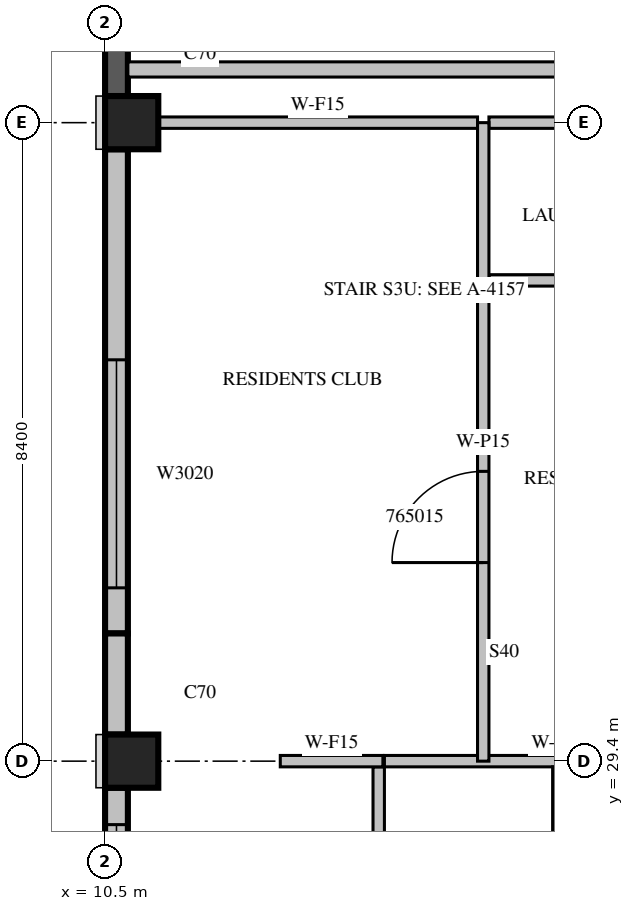
"""IFC4 building model, lengths in metres.
Left out: names, types, materials, properties, quantities, classifications, styles, units other than length and angle.
Written with IfcOpenShell. Run it as: python <this file> out.ifc"""

import sys

from ifc_helpers import new_model, si_unit, direction, frame, frame_2d, origin, origin_2d, place, context, subcontext, project, spatial, rectangle, extrude, source, transform, mapped, element, fill, save


model = new_model("IFC4")
c1 = context("Model", 3, precision=1e-05, world=origin(), true_north=direction((0.0, 1.0)))
c2 = subcontext(c1, "Body", "Model", "MODEL_VIEW")
j1 = project(units=[si_unit("LENGTHUNIT", "METRE"), si_unit("PLANEANGLEUNIT", "RADIAN")], contexts=[c1])
p1 = place(None, origin())
s1 = spatial("IfcSite", under=j1, at=p1, CompositionType="ELEMENT")
p2 = place(p1, origin())
s2 = spatial("IfcBuilding", under=s1, at=p2, CompositionType="ELEMENT")
p3 = place(p2, frame((0.0, 0.0, 288.0)))
s3 = spatial("IfcBuildingStorey", under=s2, at=p3, CompositionType="ELEMENT", Elevation=288.0)
m1 = source(origin(), c2, "Body", "SweptSolid", [
    extrude(rectangle(XDim=0.7, YDim=0.7, at=origin_2d()), origin(), (0.0, 0.0, 1.0), 3.5),
])
for number, where, z_axis, x_axis in (
    (1, (10.85, 29.4, 0.0), (0.0, 0.0, 1.0), (1.0, 0.0, 0.0)),
    (2, (10.85, 37.8, 0.0), (0.0, 0.0, 1.0), (1.0, 0.0, 0.0)),
):
    element("IfcColumn", number, at=place(p3, frame(where, z_axis=z_axis, x_axis=x_axis)), inside=s3, PredefinedType="COLUMN", context=c2, shape_type="MappedRepresentation", body=[
        mapped(m1, transform((0.0, 0.0, 0.0), scale=1.0)),
    ])
m2 = source(origin(), c2, "Body", "SweptSolid", [
    extrude(rectangle(XDim=5.53, YDim=0.3, at=frame_2d((2.765, 0.0))), origin(), (0.0, 0.0, 1.0), 3.1),
])
p4 = place(p3, frame((10.65, 43.68, 0.0), z_axis=(0.0, 0.0, 1.0), x_axis=(0.0, -1.0, 0.0)))
e3 = element("IfcWall", 3, at=p4, inside=s3, PredefinedType="SOLIDWALL", context=c2, shape_type="MappedRepresentation", body=[
    mapped(m2, transform((0.0, 0.0, 0.0), scale=1.0)),
])
p5 = place(p3, frame((10.65, 37.45, 0.0), z_axis=(0.0, 0.0, 1.0), x_axis=(0.0, -1.0, 0.0)))
e4 = element("IfcWall", 4, at=p5, inside=s3, PredefinedType="STANDARD", context=c2, shape_type="SweptSolid", body=[
    extrude(rectangle(XDim=6.37, YDim=0.3, at=frame_2d((3.185, 0.0))), origin(), (0.0, 0.0, 1.0), 3.1),
])
m3 = source(origin(), c2, "Body", "SweptSolid", [
    extrude(rectangle(XDim=3.0, YDim=2.0, at=frame_2d((1.5, 1.0))), frame((0.0, 0.16, 0.0), z_axis=(0.0, -1.0, 0.0), x_axis=(1.0, 0.0, 0.0)), (0.0, 0.0, 1.0), 0.32),
])
p6 = place(p5, frame((2.77, 0.0, 0.6)))
e5 = element("IfcOpeningElement", 5, at=p6, cuts=e4, PredefinedType="OPENING", context=c2, shape_type="MappedRepresentation", body=[
    mapped(m3, transform((0.0, 0.0, 0.0), scale=1.0)),
])
p7 = place(p3, frame((10.65, 31.08, 0.0), z_axis=(0.0, 0.0, 1.0), x_axis=(0.0, -1.0, 0.0)))
e6 = element("IfcWall", 6, at=p7, inside=s3, PredefinedType="STANDARD", context=c2, shape_type="SweptSolid", body=[
    extrude(rectangle(XDim=1.33, YDim=0.3, at=frame_2d((0.665, 0.0))), origin(), (0.0, 0.0, 1.0), 3.1),
])
p8 = place(p3, frame((10.65, 29.05, 0.0), z_axis=(0.0, 0.0, 1.0), x_axis=(0.0, -1.0, 0.0)))
e7 = element("IfcWall", 7, at=p8, inside=s3, PredefinedType="STANDARD", context=c2, shape_type="SweptSolid", body=[
    extrude(rectangle(XDim=2.17, YDim=0.3, at=frame_2d((1.085, 0.0))), origin(), (0.0, 0.0, 1.0), 3.1),
])
m4 = source(origin(), c2, "Body", "SweptSolid", [
    extrude(rectangle(XDim=1.2, YDim=2.0, at=frame_2d((0.6, 1.0))), frame((0.0, 0.16, 0.0), z_axis=(0.0, -1.0, 0.0), x_axis=(1.0, 0.0, 0.0)), (0.0, 0.0, 1.0), 0.32),
])
p9 = place(p8, frame((0.485, 0.0, 0.6)))
e8 = element("IfcOpeningElement", 8, at=p9, cuts=e7, PredefinedType="OPENING", context=c2, shape_type="MappedRepresentation", body=[
    mapped(m4, transform((0.0, 0.0, 0.0), scale=1.0)),
])
m5 = source(origin(), c2, "Body", "SweptSolid", [
    extrude(rectangle(XDim=8.0, YDim=0.2, at=frame_2d((4.0, 0.0))), origin(), (0.0, 0.0, 1.0), 3.1),
])
p10 = place(p3, frame((10.8, 38.5, 0.0), z_axis=(0.0, 0.0, 1.0), x_axis=(1.0, 0.0, 0.0)))
e9 = element("IfcWall", 9, at=p10, inside=s3, PredefinedType="PARTITIONING", context=c2, shape_type="MappedRepresentation", body=[
    mapped(m5, transform((0.0, 0.0, 0.0), scale=1.0)),
])
m6 = source(origin(), c2, "Body", "SweptSolid", [
    extrude(rectangle(XDim=4.575, YDim=0.15, at=frame_2d((2.288, 0.0))), origin(), (0.0, 0.0, 1.0), 3.1),
])
p11 = place(p3, frame((18.75, 29.4, 0.0), z_axis=(0.0, 0.0, 1.0), x_axis=(-1.0, 0.0, 0.0)))
e10 = element("IfcWall", 10, at=p11, inside=s3, PredefinedType="PARTITIONING", context=c2, shape_type="MappedRepresentation", body=[
    mapped(m6, transform((0.0, 0.0, 0.0), scale=1.0)),
])
m7 = source(origin(), c2, "Body", "SweptSolid", [
    extrude(rectangle(XDim=5.75, YDim=0.15, at=frame_2d((2.875, 0.0))), origin(), (0.0, 0.0, 1.0), 3.1),
])
p12 = place(p3, frame((16.463, 23.575, 0.0), z_axis=(0.0, 0.0, 1.0), x_axis=(0.0, 1.0, 0.0)))
e11 = element("IfcWall", 11, at=p12, inside=s3, PredefinedType="PARTITIONING", context=c2, shape_type="MappedRepresentation", body=[
    mapped(m7, transform((0.0, 0.0, 0.0), scale=1.0)),
])
m8 = source(origin(), c2, "Body", "SweptSolid", [
    extrude(rectangle(XDim=7.725, YDim=0.15, at=frame_2d((3.862, 0.0))), origin(), (0.0, 0.0, 1.0), 3.1),
])
p13 = place(p3, frame((14.1, 29.325, 0.0), z_axis=(0.0, 0.0, 1.0), x_axis=(0.0, -1.0, 0.0)))
e12 = element("IfcWall", 12, at=p13, inside=s3, PredefinedType="PARTITIONING", context=c2, shape_type="MappedRepresentation", body=[
    mapped(m8, transform((0.0, 0.0, 0.0), scale=1.0)),
])
m9 = source(origin(), c2, "Body", "SweptSolid", [
    extrude(rectangle(XDim=1.0, YDim=2.1, at=frame_2d((0.5, 1.05))), frame((0.0, 0.085, 0.0), z_axis=(0.0, -1.0, 0.0), x_axis=(1.0, 0.0, 0.0)), (0.0, 0.0, 1.0), 0.17),
])
p14 = place(p13, frame((6.275, 0.0, 0.0)))
e13 = element("IfcOpeningElement", 13, at=p14, cuts=e12, PredefinedType="OPENING", context=c2, shape_type="MappedRepresentation", body=[
    mapped(m9, transform((0.0, 0.0, 0.0), scale=1.0)),
])
m10 = source(origin(), c2, "Body", "SweptSolid", [
    extrude(rectangle(XDim=3.2, YDim=0.15, at=frame_2d((1.6, 0.0))), origin(), (0.0, 0.0, 1.0), 3.1),
])
p15 = place(p3, frame((18.75, 35.725, 0.0), z_axis=(0.0, 0.0, 1.0), x_axis=(-1.0, 0.0, 0.0)))
e14 = element("IfcWall", 14, at=p15, inside=s3, PredefinedType="PARTITIONING", context=c2, shape_type="MappedRepresentation", body=[
    mapped(m10, transform((0.0, 0.0, 0.0), scale=1.0)),
])
p16 = place(p3, frame((14.155, 29.4, 0.0), z_axis=(0.0, 0.0, 1.0), x_axis=(-1.0, 0.0, 0.0)))
e15 = element("IfcWall", 15, at=p16, inside=s3, PredefinedType="PARTITIONING", context=c2, shape_type="SweptSolid", body=[
    extrude(rectangle(XDim=1.35, YDim=0.15, at=frame_2d((0.675, 0.0))), origin(), (0.0, 0.0, 1.0), 3.1),
])
m11 = source(origin(), c2, "Body", "SweptSolid", [
    extrude(rectangle(XDim=4.201, YDim=0.15, at=frame_2d((2.1, 0.0))), origin(), (0.0, 0.0, 1.0), 3.1),
])
p17 = place(p3, frame((15.4, 37.8, 0.0), z_axis=(0.0, 0.0, 1.0), x_axis=(-1.0, 0.0, 0.0)))
e16 = element("IfcWall", 16, at=p17, inside=s3, PredefinedType="PARTITIONING", context=c2, shape_type="MappedRepresentation", body=[
    mapped(m11, transform((0.0, 0.0, 0.0), scale=1.0)),
])
p18 = place(p3, frame((18.75, 37.8, 0.0), z_axis=(0.0, 0.0, 1.0), x_axis=(-1.0, 0.0, 0.0)))
e17 = element("IfcWall", 17, at=p18, inside=s3, PredefinedType="PARTITIONING", context=c2, shape_type="MappedRepresentation", body=[
    mapped(m10, transform((0.0, 0.0, 0.0), scale=1.0)),
])
m12 = source(origin(), c2, "Body", "SweptSolid", [
    extrude(rectangle(XDim=8.4, YDim=0.15, at=frame_2d((4.2, 0.0))), origin(), (0.0, 0.0, 1.0), 3.1),
])
p19 = place(p3, frame((15.475, 29.4, 0.0), z_axis=(0.0, 0.0, 1.0), x_axis=(0.0, 1.0, 0.0)))
e18 = element("IfcWall", 18, at=p19, inside=s3, PredefinedType="PARTITIONING", context=c2, shape_type="MappedRepresentation", body=[
    mapped(m12, transform((0.0, 0.0, 0.0), scale=1.0)),
])
m13 = source(origin(), c2, "Body", "SweptSolid", [
    extrude(rectangle(XDim=1.2, YDim=2.1, at=frame_2d((0.6, 1.05))), frame((0.0, 0.085, 0.0), z_axis=(0.0, -1.0, 0.0), x_axis=(1.0, 0.0, 0.0)), (0.0, 0.0, 1.0), 0.17),
])
p20 = place(p19, frame((2.612, 0.0, 0.0)))
e19 = element("IfcOpeningElement", 19, at=p20, cuts=e18, PredefinedType="OPENING", context=c2, shape_type="MappedRepresentation", body=[
    mapped(m13, transform((0.0, 0.0, 0.0), scale=1.0)),
])
m14 = source(origin(), c2, "Body", "SweptSolid", [
    extrude(rectangle(XDim=3.0, YDim=2.0, at=frame_2d((1.5, 1.0))), frame((0.0, 0.03, 0.0), z_axis=(0.0, -1.0, 0.0), x_axis=(1.0, 0.0, 0.0)), (0.0, 0.0, 1.0), 0.06),
])
p21 = place(p6, origin())
e20 = element("IfcWindow", 20, at=p21, inside=s3, PartitioningType="SINGLE_PANEL", PredefinedType="WINDOW", context=c2, shape_type="MappedRepresentation", body=[
    mapped(m14, transform((0.0, 0.0, 0.0), scale=1.0)),
])
fill(e5, e20)
m15 = source(origin(), c2, "Body", "SweptSolid", [
    extrude(rectangle(XDim=1.2, YDim=2.0, at=frame_2d((0.6, 1.0))), frame((0.0, 0.03, 0.0), z_axis=(0.0, -1.0, 0.0), x_axis=(1.0, 0.0, 0.0)), (0.0, 0.0, 1.0), 0.06),
])
p22 = place(p9, origin())
e21 = element("IfcWindow", 21, at=p22, inside=s3, PartitioningType="SINGLE_PANEL", PredefinedType="WINDOW", context=c2, shape_type="MappedRepresentation", body=[
    mapped(m15, transform((0.0, 0.0, 0.0), scale=1.0)),
])
fill(e8, e21)
m16 = source(origin(), c2, "Body", "SweptSolid", [
    extrude(rectangle(XDim=1.2, YDim=2.1, at=frame_2d((0.6, 1.05))), frame((0.0, 0.025, 0.0), z_axis=(0.0, -1.0, 0.0), x_axis=(1.0, 0.0, 0.0)), (0.0, 0.0, 1.0), 0.05),
])
p23 = place(p20, origin())
e22 = element("IfcDoor", 22, at=p23, inside=s3, OperationType="SINGLE_SWING_LEFT", PredefinedType="DOOR", context=c2, shape_type="MappedRepresentation", body=[
    mapped(m16, transform((0.0, 0.0, 0.0), scale=1.0)),
])
fill(e19, e22)
save(model, sys.argv[1])
